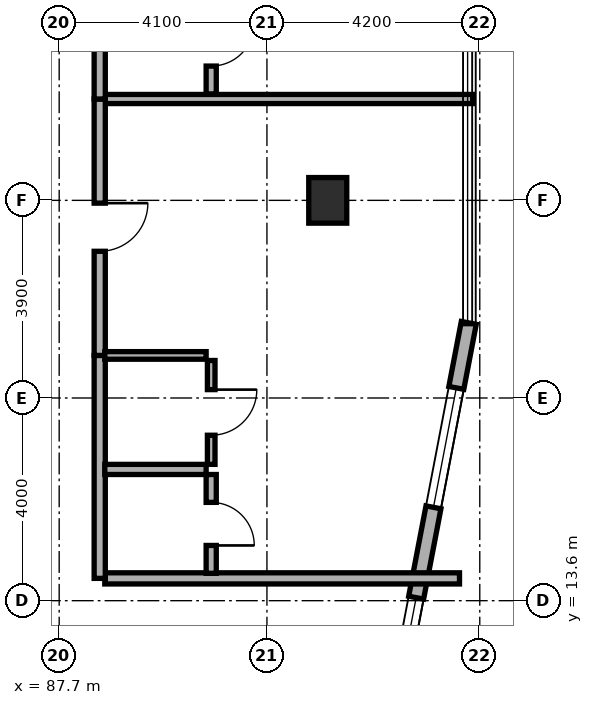
"""IFC4 building model, lengths in metres.
Left out: names, types, materials, properties, quantities, classifications, styles, units other than length and angle.
Written with IfcOpenShell. Run it as: python <this file> out.ifc"""

import sys

from ifc_helpers import new_model, si_unit, direction, frame, frame_2d, origin, origin_2d, place, context, subcontext, project, spatial, rectangle, extrude, element, fill, save


model = new_model("IFC4")
c1 = context("Model", 3, precision=1e-05, world=origin(), true_north=direction((0.0, 1.0)))
c2 = subcontext(c1, "Body", "Model", "MODEL_VIEW")
j1 = project(units=[si_unit("LENGTHUNIT", "METRE"), si_unit("PLANEANGLEUNIT", "RADIAN")], contexts=[c1])
p1 = place(None, origin())
s1 = spatial("IfcSite", under=j1, at=p1, CompositionType="ELEMENT")
p2 = place(p1, origin())
s2 = spatial("IfcBuilding", under=s1, at=p2, CompositionType="ELEMENT")
p3 = place(p2, frame((0.0, 0.0, 48.5)))
s3 = spatial("IfcBuildingStorey", under=s2, at=p3, CompositionType="ELEMENT", Elevation=48.5)
p4 = place(p3, frame((93.0, 21.5, 0.0), z_axis=(0.0, 0.0, 1.0), x_axis=(1.0, 0.0, 0.0)))
e1 = element("IfcColumn", 1, at=p4, inside=s3, PredefinedType="COLUMN", context=c2, shape_type="SweptSolid", body=[
    extrude(rectangle(XDim=0.75, YDim=0.9, at=origin_2d()), origin(), (0.0, 0.0, 1.0), 3.5),
])
p5 = place(p3, frame((93.971, 9.62, 0.0), z_axis=(0.0, 0.0, 1.0), x_axis=(0.188087874316, 0.982152203854, 0.0)))
e2 = element("IfcWall", 2, at=p5, inside=s3, PredefinedType="STANDARD", context=c2, shape_type="SweptSolid", body=[
    extrude(rectangle(XDim=9.634, YDim=0.3, at=frame_2d((4.817, 0.0))), origin(), (0.0, 0.0, 1.0), 3.25),
])
p6 = place(p5, frame((0.452, 0.0, 0.85)))
e3 = element("IfcOpeningElement", 3, at=p6, cuts=e2, PredefinedType="OPENING", context=c2, shape_type="SweptSolid", body=[
    extrude(rectangle(XDim=1.5, YDim=1.5, at=frame_2d((0.75, 0.75))), frame((0.0, 0.16, 0.0), z_axis=(0.0, -1.0, 0.0), x_axis=(1.0, 0.0, 0.0)), (0.0, 0.0, 1.0), 0.32),
])
p7 = place(p5, frame((2.913, 0.0, 0.85)))
e4 = element("IfcOpeningElement", 4, at=p7, cuts=e2, PredefinedType="OPENING", context=c2, shape_type="SweptSolid", body=[
    extrude(rectangle(XDim=1.2, YDim=1.5, at=frame_2d((0.6, 0.75))), frame((0.0, 0.16, 0.0), z_axis=(0.0, -1.0, 0.0), x_axis=(1.0, 0.0, 0.0)), (0.0, 0.0, 1.0), 0.32),
])
p8 = place(p5, frame((5.928, 0.0, 0.8)))
e5 = element("IfcOpeningElement", 5, at=p8, cuts=e2, PredefinedType="OPENING", context=c2, shape_type="SweptSolid", body=[
    extrude(rectangle(XDim=2.4, YDim=1.6, at=frame_2d((1.2, 0.8))), frame((0.0, 0.16, 0.0), z_axis=(0.0, -1.0, 0.0), x_axis=(1.0, 0.0, 0.0)), (0.0, 0.0, 1.0), 0.32),
])
p9 = place(p3, frame((88.6, 14.04, 0.0), z_axis=(0.0, 0.0, 1.0), x_axis=(1.0, 0.0, 0.0)))
e6 = element("IfcWall", 6, at=p9, inside=s3, PredefinedType="SOLIDWALL", context=c2, shape_type="SweptSolid", body=[
    extrude(rectangle(XDim=7.0, YDim=0.22, at=frame_2d((3.5, 0.0))), origin(), (0.0, 0.0, 1.0), 2.865),
])
p10 = place(p3, frame((88.5, 23.5, 0.0), z_axis=(0.0, 0.0, 1.0), x_axis=(1.0, 0.0, 0.0)))
e7 = element("IfcWall", 7, at=p10, inside=s3, PredefinedType="SOLIDWALL", context=c2, shape_type="SweptSolid", body=[
    extrude(rectangle(XDim=7.36, YDim=0.18, at=frame_2d((3.68, 0.0))), origin(), (0.0, 0.0, 1.0), 2.865),
])
p11 = place(p3, frame((88.5, 14.04, 0.0), z_axis=(0.0, 0.0, 1.0), x_axis=(0.0, 1.0, 0.0)))
e8 = element("IfcWall", 8, at=p11, inside=s3, PredefinedType="SOLIDWALL", context=c2, shape_type="SweptSolid", body=[
    extrude(rectangle(XDim=4.4, YDim=0.22, at=frame_2d((2.2, 0.0))), origin(), (0.0, 0.0, 1.0), 3.22),
])
p12 = place(p3, frame((88.5, 18.44, 0.0), z_axis=(0.0, 0.0, 1.0), x_axis=(0.0, 1.0, 0.0)))
e9 = element("IfcWall", 9, at=p12, inside=s3, PredefinedType="SOLIDWALL", context=c2, shape_type="SweptSolid", body=[
    extrude(rectangle(XDim=5.06, YDim=0.22, at=frame_2d((2.53, 0.0))), origin(), (0.0, 0.0, 1.0), 2.725),
])
p13 = place(p12, frame((2.055, 0.0, 0.0)))
e10 = element("IfcOpeningElement", 10, at=p13, cuts=e9, PredefinedType="OPENING", context=c2, shape_type="SweptSolid", body=[
    extrude(rectangle(XDim=0.95, YDim=2.1, at=frame_2d((0.475, 1.05))), frame((0.0, 0.12, 0.0), z_axis=(0.0, -1.0, 0.0), x_axis=(1.0, 0.0, 0.0)), (0.0, 0.0, 1.0), 0.24),
])
p14 = place(p3, frame((88.6, 16.19, 0.0), z_axis=(0.0, 0.0, 1.0), x_axis=(1.0, 0.0, 0.0)))
e11 = element("IfcWall", 11, at=p14, inside=s3, PredefinedType="PLUMBINGWALL", context=c2, shape_type="SweptSolid", body=[
    extrude(rectangle(XDim=2.0, YDim=0.2, at=frame_2d((1.0, 0.0))), origin(), (0.0, 0.0, 1.0), 3.22),
])
p15 = place(p3, frame((88.6, 18.44, 0.0), z_axis=(0.0, 0.0, 1.0), x_axis=(1.0, 0.0, 0.0)))
e12 = element("IfcWall", 12, at=p15, inside=s3, PredefinedType="PARTITIONING", context=c2, shape_type="SweptSolid", body=[
    extrude(rectangle(XDim=2.0, YDim=0.15, at=frame_2d((1.0, 0.0))), origin(), (0.0, 0.0, 1.0), 3.22),
])
p16 = place(p3, frame((90.7, 14.14, 0.0), z_axis=(0.0, 0.0, 1.0), x_axis=(0.0, 1.0, 0.0)))
e13 = element("IfcWall", 13, at=p16, inside=s3, PredefinedType="PLUMBINGWALL", context=c2, shape_type="SweptSolid", body=[
    extrude(rectangle(XDim=1.95, YDim=0.2, at=frame_2d((0.975, 0.0))), origin(), (0.0, 0.0, 1.0), 3.22),
])
p17 = place(p16, frame((0.55, 0.0, 0.0)))
e14 = element("IfcOpeningElement", 14, at=p17, cuts=e13, PredefinedType="OPENING", context=c2, shape_type="SweptSolid", body=[
    extrude(rectangle(XDim=0.85, YDim=2.1, at=frame_2d((0.425, 1.05))), frame((0.0, 0.11, 0.0), z_axis=(0.0, -1.0, 0.0), x_axis=(1.0, 0.0, 0.0)), (0.0, 0.0, 1.0), 0.22),
])
p18 = place(p3, frame((90.7, 16.29, 0.0), z_axis=(0.0, 0.0, 1.0), x_axis=(0.0, 1.0, 0.0)))
e15 = element("IfcWall", 15, at=p18, inside=s3, PredefinedType="PARTITIONING", context=c2, shape_type="SweptSolid", body=[
    extrude(rectangle(XDim=2.05, YDim=0.15, at=frame_2d((1.025, 0.0))), origin(), (0.0, 0.0, 1.0), 3.22),
])
p19 = place(p18, frame((0.575, 0.0, 0.0)))
e16 = element("IfcOpeningElement", 16, at=p19, cuts=e15, PredefinedType="OPENING", context=c2, shape_type="SweptSolid", body=[
    extrude(rectangle(XDim=0.9, YDim=2.1, at=frame_2d((0.45, 1.05))), frame((0.0, 0.085, 0.0), z_axis=(0.0, -1.0, 0.0), x_axis=(1.0, 0.0, 0.0)), (0.0, 0.0, 1.0), 0.17),
])
p20 = place(p3, frame((88.5, 23.5, 0.0), z_axis=(0.0, 0.0, 1.0), x_axis=(0.0, 1.0, 0.0)))
e17 = element("IfcWall", 17, at=p20, inside=s3, PredefinedType="SOLIDWALL", context=c2, shape_type="SweptSolid", body=[
    extrude(rectangle(XDim=4.4, YDim=0.22, at=frame_2d((2.2, 0.0))), origin(), (0.0, 0.0, 1.0), 3.22),
])
p21 = place(p3, frame((90.7, 23.6, 0.0), z_axis=(0.0, 0.0, 1.0), x_axis=(0.0, 1.0, 0.0)))
e18 = element("IfcWall", 18, at=p21, inside=s3, PredefinedType="PLUMBINGWALL", context=c2, shape_type="SweptSolid", body=[
    extrude(rectangle(XDim=1.95, YDim=0.2, at=frame_2d((0.975, 0.0))), origin(), (0.0, 0.0, 1.0), 3.22),
])
p22 = place(p21, frame((0.55, 0.0, 0.0)))
e19 = element("IfcOpeningElement", 19, at=p22, cuts=e18, PredefinedType="OPENING", context=c2, shape_type="SweptSolid", body=[
    extrude(rectangle(XDim=0.85, YDim=2.1, at=frame_2d((0.425, 1.05))), frame((0.0, 0.11, 0.0), z_axis=(0.0, -1.0, 0.0), x_axis=(1.0, 0.0, 0.0)), (0.0, 0.0, 1.0), 0.22),
])
p23 = place(p7, origin())
e20 = element("IfcWindow", 20, at=p23, inside=s3, PartitioningType="SINGLE_PANEL", PredefinedType="WINDOW", context=c2, shape_type="SweptSolid", body=[
    extrude(rectangle(XDim=1.2, YDim=1.5, at=frame_2d((0.6, 0.75))), frame((0.0, 0.03, 0.0), z_axis=(0.0, -1.0, 0.0), x_axis=(1.0, 0.0, 0.0)), (0.0, 0.0, 1.0), 0.06),
])
fill(e4, e20)
p24 = place(p8, origin())
e21 = element("IfcWindow", 21, at=p24, inside=s3, PartitioningType="SINGLE_PANEL", PredefinedType="WINDOW", context=c2, shape_type="SweptSolid", body=[
    extrude(rectangle(XDim=2.4, YDim=1.6, at=frame_2d((1.2, 0.8))), frame((0.0, 0.03, 0.0), z_axis=(0.0, -1.0, 0.0), x_axis=(1.0, 0.0, 0.0)), (0.0, 0.0, 1.0), 0.06),
])
fill(e5, e21)
p25 = place(p13, frame((0.95, 0.0, 0.0), z_axis=(0.0, 0.0, 1.0), x_axis=(-1.0, 0.0, 0.0)))
e22 = element("IfcDoor", 22, at=p25, inside=s3, OperationType="SINGLE_SWING_LEFT", PredefinedType="DOOR", context=c2, shape_type="SweptSolid", body=[
    extrude(rectangle(XDim=0.95, YDim=2.1, at=frame_2d((0.475, 1.05))), frame((0.0, 0.025, 0.0), z_axis=(0.0, -1.0, 0.0), x_axis=(1.0, 0.0, 0.0)), (0.0, 0.0, 1.0), 0.05),
])
fill(e10, e22)
p26 = place(p17, frame((0.85, 0.0, 0.0), z_axis=(0.0, 0.0, 1.0), x_axis=(-1.0, 0.0, 0.0)))
e23 = element("IfcDoor", 23, at=p26, inside=s3, OperationType="SINGLE_SWING_RIGHT", PredefinedType="DOOR", context=c2, shape_type="SweptSolid", body=[
    extrude(rectangle(XDim=0.85, YDim=2.1, at=frame_2d((0.425, 1.05))), frame((0.0, 0.025, 0.0), z_axis=(0.0, -1.0, 0.0), x_axis=(1.0, 0.0, 0.0)), (0.0, 0.0, 1.0), 0.05),
])
fill(e14, e23)
p27 = place(p19, frame((0.9, 0.0, 0.0), z_axis=(0.0, 0.0, 1.0), x_axis=(-1.0, 0.0, 0.0)))
e24 = element("IfcDoor", 24, at=p27, inside=s3, OperationType="SINGLE_SWING_LEFT", PredefinedType="DOOR", context=c2, shape_type="SweptSolid", body=[
    extrude(rectangle(XDim=0.9, YDim=2.1, at=frame_2d((0.45, 1.05))), frame((0.0, 0.025, 0.0), z_axis=(0.0, -1.0, 0.0), x_axis=(1.0, 0.0, 0.0)), (0.0, 0.0, 1.0), 0.05),
])
fill(e16, e24)
p28 = place(p22, frame((0.85, 0.0, 0.0), z_axis=(0.0, 0.0, 1.0), x_axis=(-1.0, 0.0, 0.0)))
e25 = element("IfcDoor", 25, at=p28, inside=s3, OperationType="SINGLE_SWING_LEFT", PredefinedType="DOOR", context=c2, shape_type="SweptSolid", body=[
    extrude(rectangle(XDim=0.85, YDim=2.1, at=frame_2d((0.425, 1.05))), frame((0.0, 0.025, 0.0), z_axis=(0.0, -1.0, 0.0), x_axis=(1.0, 0.0, 0.0)), (0.0, 0.0, 1.0), 0.05),
])
fill(e19, e25)
save(model, sys.argv[1])
